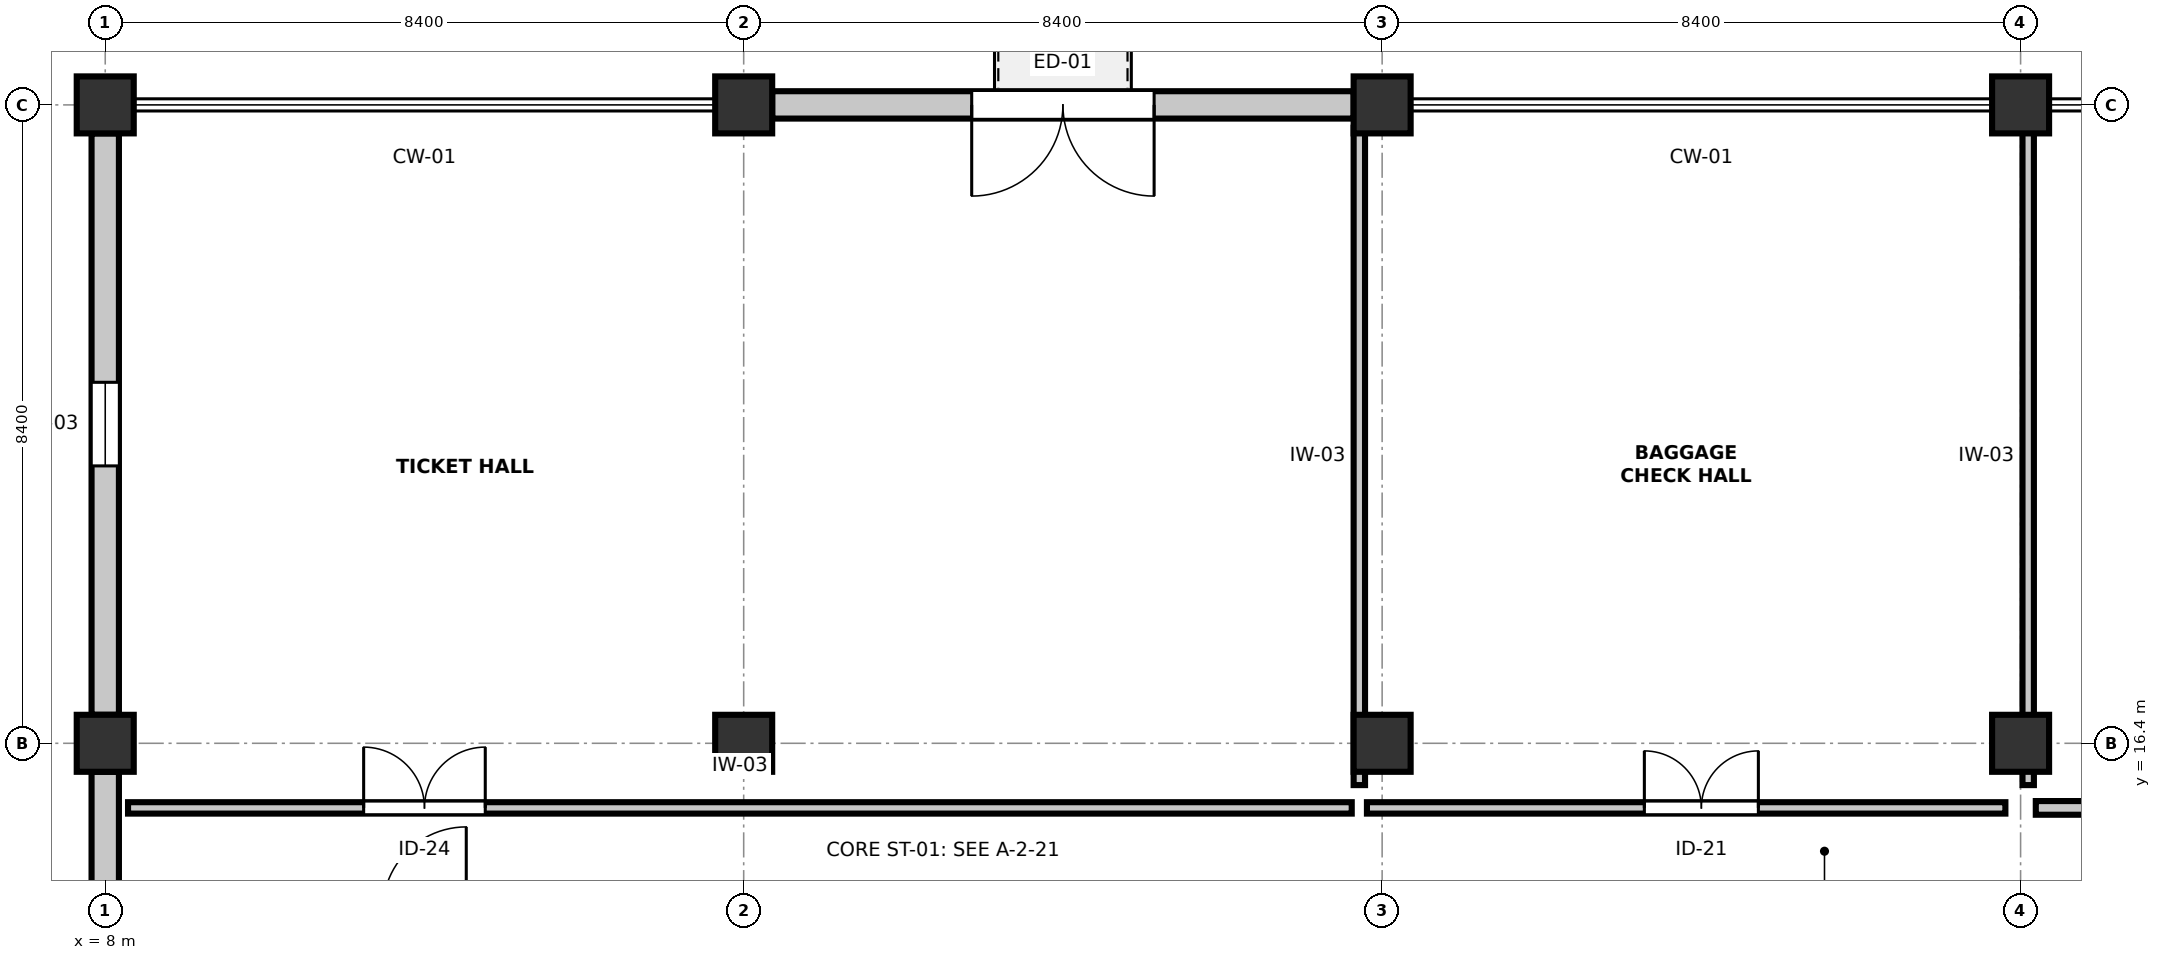
"""IFC4 building model, lengths in metres.
Left out: names, types, materials, properties, quantities, classifications, styles, units other than length and angle.
Written with IfcOpenShell. Run it as: python <this file> out.ifc"""

import sys

from ifc_helpers import new_model, si_unit, direction, frame, frame_2d, origin, origin_2d, place, context, subcontext, project, spatial, rectangle, extrude, element, fill, save


model = new_model("IFC4")
c1 = context("Model", 3, precision=1e-05, world=origin(), true_north=direction((0.0, 1.0)))
c2 = subcontext(c1, "Body", "Model", "MODEL_VIEW")
j1 = project(units=[si_unit("LENGTHUNIT", "METRE"), si_unit("PLANEANGLEUNIT", "RADIAN")], contexts=[c1])
p1 = place(None, origin())
s1 = spatial("IfcSite", under=j1, at=p1, CompositionType="ELEMENT")
p2 = place(p1, origin())
s2 = spatial("IfcBuilding", under=s1, at=p2, CompositionType="ELEMENT")
p3 = place(p2, origin())
s3 = spatial("IfcBuildingStorey", under=s2, at=p3, CompositionType="ELEMENT", Elevation=0.0)
for number, where, z_axis, x_axis in (
    (1, (8.0, 16.4, 0.0), (0.0, 0.0, 1.0), (1.0, 0.0, 0.0)),
    (2, (8.0, 24.8, 0.0), (0.0, 0.0, 1.0), (1.0, 0.0, 0.0)),
    (3, (16.4, 16.4, 0.0), (0.0, 0.0, 1.0), (1.0, 0.0, 0.0)),
    (4, (16.4, 24.8, 0.0), (0.0, 0.0, 1.0), (1.0, 0.0, 0.0)),
    (5, (24.8, 16.4, 0.0), (0.0, 0.0, 1.0), (1.0, 0.0, 0.0)),
    (6, (24.8, 24.8, 0.0), (0.0, 0.0, 1.0), (1.0, 0.0, 0.0)),
    (7, (33.2, 16.4, 0.0), (0.0, 0.0, 1.0), (1.0, 0.0, 0.0)),
    (8, (33.2, 24.8, 0.0), (0.0, 0.0, 1.0), (1.0, 0.0, 0.0)),
):
    element("IfcColumn", number, at=place(p3, frame(where, z_axis=z_axis, x_axis=x_axis)), inside=s3, PredefinedType="COLUMN", context=c2, shape_type="SweptSolid", body=[
        extrude(rectangle(XDim=0.75, YDim=0.75, at=origin_2d()), origin(), (0.0, 0.0, 1.0), 4.8),
    ])
p4 = place(p3, frame((24.425, 24.8, 0.0), z_axis=(0.0, 0.0, 1.0), x_axis=(-1.0, 0.0, 0.0)))
e9 = element("IfcWall", 9, at=p4, inside=s3, PredefinedType="STANDARD", context=c2, shape_type="SweptSolid", body=[
    extrude(rectangle(XDim=7.65, YDim=0.36, at=frame_2d((3.825, 0.0))), origin(), (0.0, 0.0, 1.0), 3.715),
])
p5 = place(p4, frame((2.625, 0.0, 0.0)))
e10 = element("IfcOpeningElement", 10, at=p5, cuts=e9, PredefinedType="OPENING", context=c2, shape_type="SweptSolid", body=[
    extrude(rectangle(XDim=2.4, YDim=2.45, at=frame_2d((1.2, 1.225))), frame((0.0, 0.19, 0.0), z_axis=(0.0, -1.0, 0.0), x_axis=(1.0, 0.0, 0.0)), (0.0, 0.0, 1.0), 0.38),
])
p6 = place(p3, frame((8.0, 16.025, 0.0), z_axis=(0.0, 0.0, 1.0), x_axis=(0.0, -1.0, 0.0)))
e11 = element("IfcWall", 11, at=p6, inside=s3, PredefinedType="STANDARD", context=c2, shape_type="SweptSolid", body=[
    extrude(rectangle(XDim=7.65, YDim=0.36, at=frame_2d((3.825, 0.0))), origin(), (0.0, 0.0, 1.0), 3.715),
])
p7 = place(p6, frame((3.275, 0.0, 0.95)))
e12 = element("IfcOpeningElement", 12, at=p7, cuts=e11, PredefinedType="OPENING", context=c2, shape_type="SweptSolid", body=[
    extrude(rectangle(XDim=1.1, YDim=1.7, at=frame_2d((0.55, 0.85))), frame((0.0, 0.19, 0.0), z_axis=(0.0, -1.0, 0.0), x_axis=(1.0, 0.0, 0.0)), (0.0, 0.0, 1.0), 0.38),
])
p8 = place(p3, frame((8.0, 24.425, 0.0), z_axis=(0.0, 0.0, 1.0), x_axis=(0.0, -1.0, 0.0)))
e13 = element("IfcWall", 13, at=p8, inside=s3, PredefinedType="STANDARD", context=c2, shape_type="SweptSolid", body=[
    extrude(rectangle(XDim=7.65, YDim=0.36, at=frame_2d((3.825, 0.0))), origin(), (0.0, 0.0, 1.0), 3.715),
])
p9 = place(p8, frame((3.275, 0.0, 0.95)))
e14 = element("IfcOpeningElement", 14, at=p9, cuts=e13, PredefinedType="OPENING", context=c2, shape_type="SweptSolid", body=[
    extrude(rectangle(XDim=1.1, YDim=1.95, at=frame_2d((0.55, 0.975))), frame((0.0, 0.19, 0.0), z_axis=(0.0, -1.0, 0.0), x_axis=(1.0, 0.0, 0.0)), (0.0, 0.0, 1.0), 0.38),
])
p10 = place(p3, frame((8.3, 15.55, 0.0), z_axis=(0.0, 0.0, 1.0), x_axis=(1.0, 0.0, 0.0)))
e15 = element("IfcWall", 15, at=p10, inside=s3, PredefinedType="PARTITIONING", context=c2, shape_type="SweptSolid", body=[
    extrude(rectangle(XDim=16.1, YDim=0.15, at=frame_2d((8.05, 0.0))), origin(), (0.0, 0.0, 1.0), 3.715),
])
p11 = place(p10, frame((3.1, 0.0, 0.0)))
e16 = element("IfcOpeningElement", 16, at=p11, cuts=e15, PredefinedType="OPENING", context=c2, shape_type="SweptSolid", body=[
    extrude(rectangle(XDim=1.6, YDim=2.28, at=frame_2d((0.8, 1.14))), frame((0.0, 0.085, 0.0), z_axis=(0.0, -1.0, 0.0), x_axis=(1.0, 0.0, 0.0)), (0.0, 0.0, 1.0), 0.17),
])
p12 = place(p3, frame((24.6, 15.55, 0.0), z_axis=(0.0, 0.0, 1.0), x_axis=(1.0, 0.0, 0.0)))
e17 = element("IfcWall", 17, at=p12, inside=s3, PredefinedType="PARTITIONING", context=c2, shape_type="SweptSolid", body=[
    extrude(rectangle(XDim=8.4, YDim=0.15, at=frame_2d((4.2, 0.0))), origin(), (0.0, 0.0, 1.0), 4.535),
])
p13 = place(p12, frame((3.65, 0.0, 0.0)))
e18 = element("IfcOpeningElement", 18, at=p13, cuts=e17, PredefinedType="OPENING", context=c2, shape_type="SweptSolid", body=[
    extrude(rectangle(XDim=1.5, YDim=2.24, at=frame_2d((0.75, 1.12))), frame((0.0, 0.085, 0.0), z_axis=(0.0, -1.0, 0.0), x_axis=(1.0, 0.0, 0.0)), (0.0, 0.0, 1.0), 0.17),
])
p14 = place(p3, frame((24.5, 15.85, 0.0), z_axis=(0.0, 0.0, 1.0), x_axis=(0.0, 1.0, 0.0)))
e19 = element("IfcWall", 19, at=p14, inside=s3, PredefinedType="PARTITIONING", context=c2, shape_type="SweptSolid", body=[
    extrude(rectangle(XDim=8.65, YDim=0.15, at=frame_2d((4.325, 0.0))), origin(), (0.0, 0.0, 1.0), 3.685),
])
p15 = place(p3, frame((33.4, 15.55, 0.0), z_axis=(0.0, 0.0, 1.0), x_axis=(1.0, 0.0, 0.0)))
e20 = element("IfcWall", 20, at=p15, inside=s3, PredefinedType="PARTITIONING", context=c2, shape_type="SweptSolid", body=[
    extrude(rectangle(XDim=7.9, YDim=0.18, at=frame_2d((3.95, 0.0))), origin(), (0.0, 0.0, 1.0), 3.785),
])
p16 = place(p15, frame((3.325, 0.0, 0.0)))
e21 = element("IfcOpeningElement", 21, at=p16, cuts=e20, PredefinedType="OPENING", context=c2, shape_type="SweptSolid", body=[
    extrude(rectangle(XDim=1.35, YDim=2.2, at=frame_2d((0.675, 1.1))), frame((0.0, 0.1, 0.0), z_axis=(0.0, -1.0, 0.0), x_axis=(1.0, 0.0, 0.0)), (0.0, 0.0, 1.0), 0.2),
])
p17 = place(p3, frame((33.3, 15.85, 0.0), z_axis=(0.0, 0.0, 1.0), x_axis=(0.0, 1.0, 0.0)))
e22 = element("IfcWall", 22, at=p17, inside=s3, PredefinedType="PARTITIONING", context=c2, shape_type="SweptSolid", body=[
    extrude(rectangle(XDim=8.65, YDim=0.15, at=frame_2d((4.325, 0.0))), origin(), (0.0, 0.0, 1.0), 3.715),
])
p18 = place(p5, origin())
e23 = element("IfcDoor", 23, at=p18, inside=s3, OperationType="DOUBLE_DOOR_SINGLE_SWING", PredefinedType="DOOR", context=c2, shape_type="SweptSolid", body=[
    extrude(rectangle(XDim=2.4, YDim=2.45, at=frame_2d((1.2, 1.225))), frame((0.0, 0.025, 0.0), z_axis=(0.0, -1.0, 0.0), x_axis=(1.0, 0.0, 0.0)), (0.0, 0.0, 1.0), 0.05),
])
fill(e10, e23)
p19 = place(p9, origin())
e24 = element("IfcWindow", 24, at=p19, inside=s3, PartitioningType="SINGLE_PANEL", PredefinedType="WINDOW", context=c2, shape_type="SweptSolid", body=[
    extrude(rectangle(XDim=1.1, YDim=1.95, at=frame_2d((0.55, 0.975))), frame((0.0, 0.03, 0.0), z_axis=(0.0, -1.0, 0.0), x_axis=(1.0, 0.0, 0.0)), (0.0, 0.0, 1.0), 0.06),
])
fill(e14, e24)
p20 = place(p11, origin())
e25 = element("IfcDoor", 25, at=p20, inside=s3, OperationType="DOUBLE_DOOR_SINGLE_SWING", PredefinedType="DOOR", context=c2, shape_type="SweptSolid", body=[
    extrude(rectangle(XDim=1.6, YDim=2.28, at=frame_2d((0.8, 1.14))), frame((0.0, 0.025, 0.0), z_axis=(0.0, -1.0, 0.0), x_axis=(1.0, 0.0, 0.0)), (0.0, 0.0, 1.0), 0.05),
])
fill(e16, e25)
p21 = place(p13, origin())
e26 = element("IfcDoor", 26, at=p21, inside=s3, OperationType="DOUBLE_DOOR_SINGLE_SWING", PredefinedType="DOOR", context=c2, shape_type="SweptSolid", body=[
    extrude(rectangle(XDim=1.5, YDim=2.24, at=frame_2d((0.75, 1.12))), frame((0.0, 0.025, 0.0), z_axis=(0.0, -1.0, 0.0), x_axis=(1.0, 0.0, 0.0)), (0.0, 0.0, 1.0), 0.05),
])
fill(e18, e26)
save(model, sys.argv[1])
